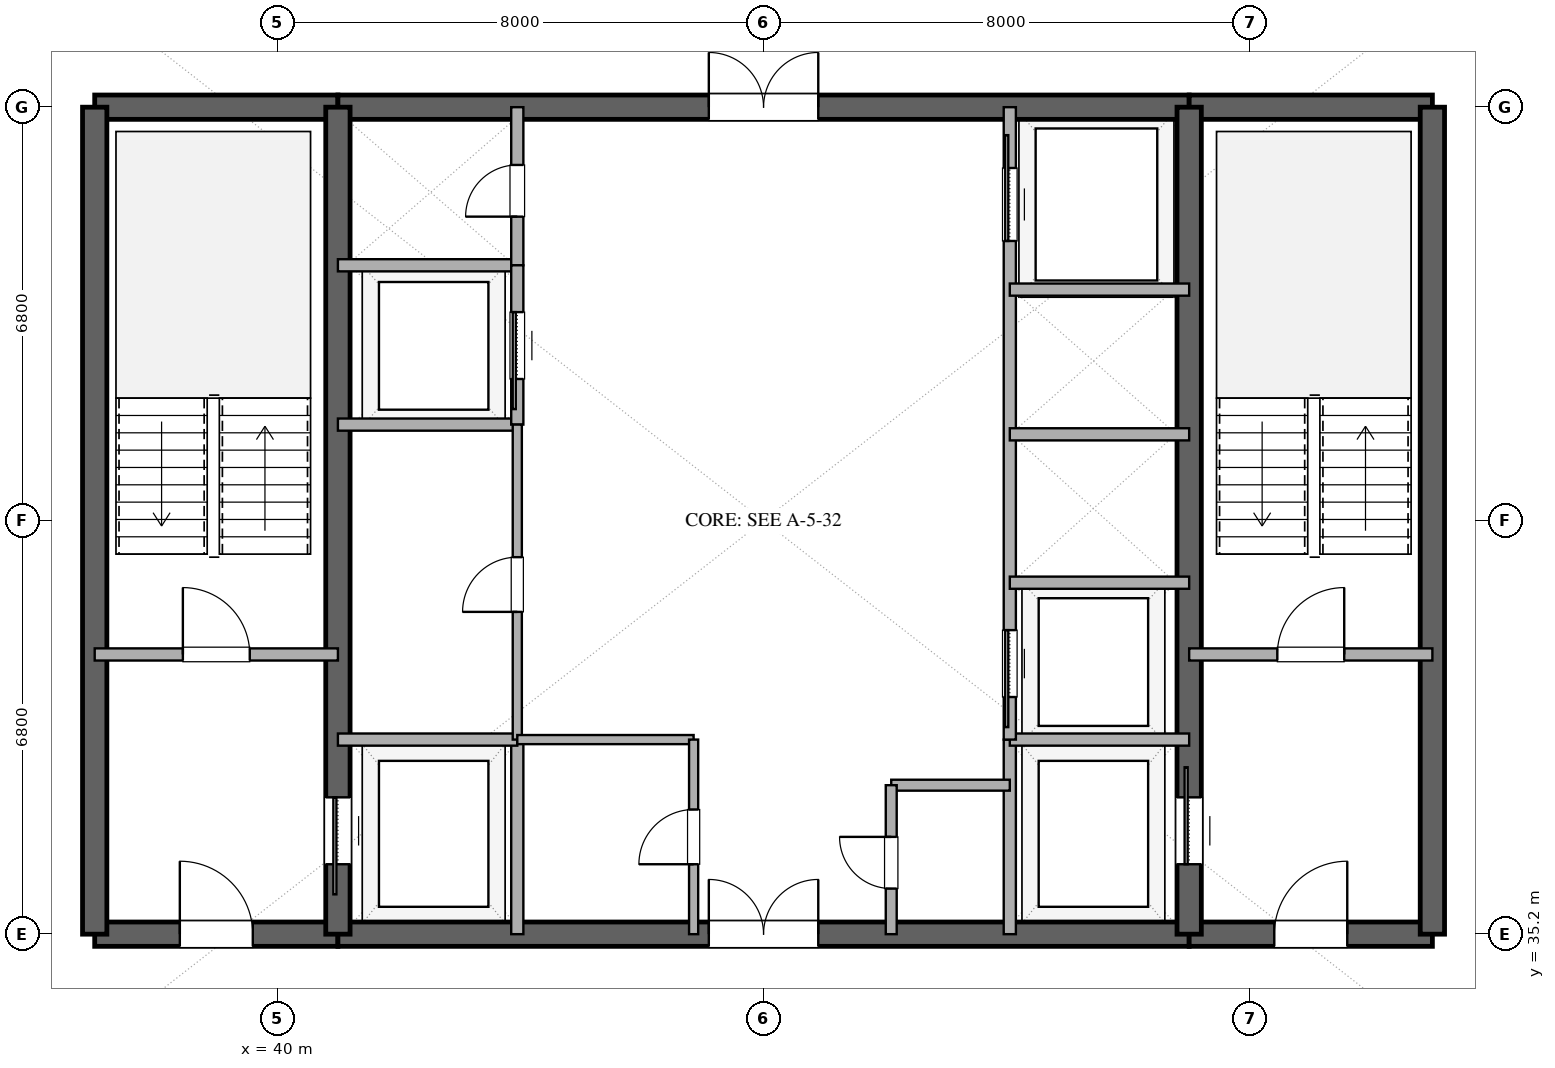
"""IFC4 building model, lengths in metres.
Left out: names, types, materials, properties, quantities, classifications, styles, units other than length and angle.
Written with IfcOpenShell. Run it as: python <this file> out.ifc"""

import sys

from ifc_helpers import new_model, si_unit, direction, frame, frame_2d, origin, place, context, subcontext, project, spatial, rectangle, extrude, element, fill, save


model = new_model("IFC4")
c1 = context("Model", 3, precision=1e-05, world=origin(), true_north=direction((0.0, 1.0)))
c2 = subcontext(c1, "Body", "Model", "MODEL_VIEW")
j1 = project(units=[si_unit("LENGTHUNIT", "METRE"), si_unit("PLANEANGLEUNIT", "RADIAN")], contexts=[c1])
p1 = place(None, origin())
s1 = spatial("IfcSite", under=j1, at=p1, CompositionType="ELEMENT")
p2 = place(p1, origin())
s2 = spatial("IfcBuilding", under=s1, at=p2, CompositionType="ELEMENT")
p3 = place(p2, frame((0.0, 0.0, 213.6)))
s3 = spatial("IfcBuildingStorey", under=s2, at=p3, CompositionType="ELEMENT", Elevation=213.6)
p4 = place(p3, frame((37.0, 35.2, 0.0), z_axis=(0.0, 0.0, 1.0), x_axis=(1.0, 0.0, 0.0)))
e1 = element("IfcWall", 1, at=p4, inside=s3, PredefinedType="SHEAR", context=c2, shape_type="SweptSolid", body=[
    extrude(rectangle(XDim=4.0, YDim=0.4, at=frame_2d((2.0, 0.0))), origin(), (0.0, 0.0, 1.0), 3.36),
])
p5 = place(p4, frame((1.4, 0.0, 0.0)))
e2 = element("IfcOpeningElement", 2, at=p5, cuts=e1, PredefinedType="OPENING", context=c2, shape_type="SweptSolid", body=[
    extrude(rectangle(XDim=1.2, YDim=2.15, at=frame_2d((0.6, 1.075))), frame((0.0, 0.21, 0.0), z_axis=(0.0, -1.0, 0.0), x_axis=(1.0, 0.0, 0.0)), (0.0, 0.0, 1.0), 0.42),
])
p6 = place(p3, frame((41.0, 35.2, 0.0), z_axis=(0.0, 0.0, 1.0), x_axis=(1.0, 0.0, 0.0)))
e3 = element("IfcWall", 3, at=p6, inside=s3, PredefinedType="SHEAR", context=c2, shape_type="SweptSolid", body=[
    extrude(rectangle(XDim=14.0, YDim=0.4, at=frame_2d((7.0, 0.0))), origin(), (0.0, 0.0, 1.0), 3.36),
])
p7 = place(p6, frame((6.1, 0.0, 0.0)))
e4 = element("IfcOpeningElement", 4, at=p7, cuts=e3, PredefinedType="OPENING", context=c2, shape_type="SweptSolid", body=[
    extrude(rectangle(XDim=1.8, YDim=2.25, at=frame_2d((0.9, 1.125))), frame((0.0, 0.21, 0.0), z_axis=(0.0, -1.0, 0.0), x_axis=(1.0, 0.0, 0.0)), (0.0, 0.0, 1.0), 0.42),
])
p8 = place(p3, frame((55.0, 35.2, 0.0), z_axis=(0.0, 0.0, 1.0), x_axis=(1.0, 0.0, 0.0)))
e5 = element("IfcWall", 5, at=p8, inside=s3, PredefinedType="SHEAR", context=c2, shape_type="SweptSolid", body=[
    extrude(rectangle(XDim=4.0, YDim=0.4, at=frame_2d((2.0, 0.0))), origin(), (0.0, 0.0, 1.0), 3.36),
])
p9 = place(p8, frame((1.4, 0.0, 0.0)))
e6 = element("IfcOpeningElement", 6, at=p9, cuts=e5, PredefinedType="OPENING", context=c2, shape_type="SweptSolid", body=[
    extrude(rectangle(XDim=1.2, YDim=2.15, at=frame_2d((0.6, 1.075))), frame((0.0, 0.21, 0.0), z_axis=(0.0, -1.0, 0.0), x_axis=(1.0, 0.0, 0.0)), (0.0, 0.0, 1.0), 0.42),
])
p10 = place(p3, frame((37.0, 48.8, 0.0), z_axis=(0.0, 0.0, 1.0), x_axis=(1.0, 0.0, 0.0)))
e7 = element("IfcWall", 7, at=p10, inside=s3, PredefinedType="SHEAR", context=c2, shape_type="SweptSolid", body=[
    extrude(rectangle(XDim=4.0, YDim=0.4, at=frame_2d((2.0, 0.0))), origin(), (0.0, 0.0, 1.0), 3.36),
])
p11 = place(p3, frame((41.0, 48.8, 0.0), z_axis=(0.0, 0.0, 1.0), x_axis=(1.0, 0.0, 0.0)))
e8 = element("IfcWall", 8, at=p11, inside=s3, PredefinedType="SHEAR", context=c2, shape_type="SweptSolid", body=[
    extrude(rectangle(XDim=14.0, YDim=0.4, at=frame_2d((7.0, 0.0))), origin(), (0.0, 0.0, 1.0), 3.36),
])
p12 = place(p11, frame((6.1, 0.0, 0.0)))
e9 = element("IfcOpeningElement", 9, at=p12, cuts=e8, PredefinedType="OPENING", context=c2, shape_type="SweptSolid", body=[
    extrude(rectangle(XDim=1.8, YDim=2.25, at=frame_2d((0.9, 1.125))), frame((0.0, 0.21, 0.0), z_axis=(0.0, -1.0, 0.0), x_axis=(1.0, 0.0, 0.0)), (0.0, 0.0, 1.0), 0.42),
])
p13 = place(p3, frame((55.0, 48.8, 0.0), z_axis=(0.0, 0.0, 1.0), x_axis=(1.0, 0.0, 0.0)))
e10 = element("IfcWall", 10, at=p13, inside=s3, PredefinedType="SHEAR", context=c2, shape_type="SweptSolid", body=[
    extrude(rectangle(XDim=4.0, YDim=0.4, at=frame_2d((2.0, 0.0))), origin(), (0.0, 0.0, 1.0), 3.36),
])
for number, where, z_axis, x_axis in (
    (11, (37.0, 35.2, 0.0), (0.0, 0.0, 1.0), (0.0, 1.0, 0.0)),
    (12, (59.0, 35.2, 0.0), (0.0, 0.0, 1.0), (0.0, 1.0, 0.0)),
):
    element("IfcWall", number, at=place(p3, frame(where, z_axis=z_axis, x_axis=x_axis)), inside=s3, PredefinedType="SHEAR", context=c2, shape_type="SweptSolid", body=[
        extrude(rectangle(XDim=13.6, YDim=0.4, at=frame_2d((6.8, 0.0))), origin(), (0.0, 0.0, 1.0), 3.36),
    ])
p14 = place(p3, frame((41.0, 35.2, 0.0), z_axis=(0.0, 0.0, 1.0), x_axis=(0.0, 1.0, 0.0)))
e13 = element("IfcWall", 13, at=p14, inside=s3, PredefinedType="SHEAR", context=c2, shape_type="SweptSolid", body=[
    extrude(rectangle(XDim=13.6, YDim=0.4, at=frame_2d((6.8, 0.0))), origin(), (0.0, 0.0, 1.0), 3.36),
])
p15 = place(p14, frame((1.15, 0.0, 0.0)))
e14 = element("IfcOpeningElement", 14, at=p15, cuts=e13, PredefinedType="OPENING", context=c2, shape_type="SweptSolid", body=[
    extrude(rectangle(XDim=1.1, YDim=2.2, at=frame_2d((0.55, 1.1))), frame((0.0, 0.21, 0.0), z_axis=(0.0, -1.0, 0.0), x_axis=(1.0, 0.0, 0.0)), (0.0, 0.0, 1.0), 0.42),
])
p16 = place(p3, frame((55.0, 35.2, 0.0), z_axis=(0.0, 0.0, 1.0), x_axis=(0.0, 1.0, 0.0)))
e15 = element("IfcWall", 15, at=p16, inside=s3, PredefinedType="SHEAR", context=c2, shape_type="SweptSolid", body=[
    extrude(rectangle(XDim=13.6, YDim=0.4, at=frame_2d((6.8, 0.0))), origin(), (0.0, 0.0, 1.0), 3.36),
])
p17 = place(p16, frame((1.15, 0.0, 0.0)))
e16 = element("IfcOpeningElement", 16, at=p17, cuts=e15, PredefinedType="OPENING", context=c2, shape_type="SweptSolid", body=[
    extrude(rectangle(XDim=1.1, YDim=2.2, at=frame_2d((0.55, 1.1))), frame((0.0, 0.21, 0.0), z_axis=(0.0, -1.0, 0.0), x_axis=(1.0, 0.0, 0.0)), (0.0, 0.0, 1.0), 0.42),
])
p18 = place(p3, frame((37.0, 39.8, 0.0), z_axis=(0.0, 0.0, 1.0), x_axis=(1.0, 0.0, 0.0)))
e17 = element("IfcWall", 17, at=p18, inside=s3, PredefinedType="SOLIDWALL", context=c2, shape_type="SweptSolid", body=[
    extrude(rectangle(XDim=4.0, YDim=0.2, at=frame_2d((2.0, 0.0))), origin(), (0.0, 0.0, 1.0), 2.72),
])
p19 = place(p18, frame((1.45, 0.0, 0.0)))
e18 = element("IfcOpeningElement", 18, at=p19, cuts=e17, PredefinedType="OPENING", context=c2, shape_type="SweptSolid", body=[
    extrude(rectangle(XDim=1.1, YDim=2.15, at=frame_2d((0.55, 1.075))), frame((0.0, 0.11, 0.0), z_axis=(0.0, -1.0, 0.0), x_axis=(1.0, 0.0, 0.0)), (0.0, 0.0, 1.0), 0.22),
])
p20 = place(p3, frame((55.0, 39.8, 0.0), z_axis=(0.0, 0.0, 1.0), x_axis=(1.0, 0.0, 0.0)))
e19 = element("IfcWall", 19, at=p20, inside=s3, PredefinedType="SOLIDWALL", context=c2, shape_type="SweptSolid", body=[
    extrude(rectangle(XDim=4.0, YDim=0.2, at=frame_2d((2.0, 0.0))), origin(), (0.0, 0.0, 1.0), 2.72),
])
p21 = place(p20, frame((1.45, 0.0, 0.0)))
e20 = element("IfcOpeningElement", 20, at=p21, cuts=e19, PredefinedType="OPENING", context=c2, shape_type="SweptSolid", body=[
    extrude(rectangle(XDim=1.1, YDim=2.15, at=frame_2d((0.55, 1.075))), frame((0.0, 0.11, 0.0), z_axis=(0.0, -1.0, 0.0), x_axis=(1.0, 0.0, 0.0)), (0.0, 0.0, 1.0), 0.22),
])
p22 = place(p3, frame((43.95, 35.2, 0.0), z_axis=(0.0, 0.0, 1.0), x_axis=(0.0, 1.0, 0.0)))
e21 = element("IfcWall", 21, at=p22, inside=s3, PredefinedType="SOLIDWALL", context=c2, shape_type="SweptSolid", body=[
    extrude(rectangle(XDim=3.2, YDim=0.2, at=frame_2d((1.6, 0.0))), origin(), (0.0, 0.0, 1.0), 2.72),
])
p23 = place(p3, frame((41.0, 38.4, 0.0), z_axis=(0.0, 0.0, 1.0), x_axis=(1.0, 0.0, 0.0)))
e22 = element("IfcWall", 22, at=p23, inside=s3, PredefinedType="SOLIDWALL", context=c2, shape_type="SweptSolid", body=[
    extrude(rectangle(XDim=2.95, YDim=0.2, at=frame_2d((1.475, 0.0))), origin(), (0.0, 0.0, 1.0), 2.72),
])
p24 = place(p3, frame((52.05, 35.2, 0.0), z_axis=(0.0, 0.0, 1.0), x_axis=(0.0, 1.0, 0.0)))
e23 = element("IfcWall", 23, at=p24, inside=s3, PredefinedType="SOLIDWALL", context=c2, shape_type="SweptSolid", body=[
    extrude(rectangle(XDim=3.2, YDim=0.2, at=frame_2d((1.6, 0.0))), origin(), (0.0, 0.0, 1.0), 2.72),
])
for number, where, z_axis, x_axis in (
    (24, (52.05, 38.4, 0.0), (0.0, 0.0, 1.0), (1.0, 0.0, 0.0)),
    (25, (41.0, 46.2, 0.0), (0.0, 0.0, 1.0), (1.0, 0.0, 0.0)),
):
    element("IfcWall", number, at=place(p3, frame(where, z_axis=z_axis, x_axis=x_axis)), inside=s3, PredefinedType="SOLIDWALL", context=c2, shape_type="SweptSolid", body=[
        extrude(rectangle(XDim=2.95, YDim=0.2, at=frame_2d((1.475, 0.0))), origin(), (0.0, 0.0, 1.0), 2.72),
    ])
p25 = place(p3, frame((43.95, 46.2, 0.0), z_axis=(0.0, 0.0, 1.0), x_axis=(0.0, 1.0, 0.0)))
e26 = element("IfcWall", 26, at=p25, inside=s3, PredefinedType="SOLIDWALL", context=c2, shape_type="SweptSolid", body=[
    extrude(rectangle(XDim=2.6, YDim=0.2, at=frame_2d((1.3, 0.0))), origin(), (0.0, 0.0, 1.0), 2.72),
])
p26 = place(p25, frame((0.8, 0.0, 0.0)))
e27 = element("IfcOpeningElement", 27, at=p26, cuts=e26, PredefinedType="OPENING", context=c2, shape_type="SweptSolid", body=[
    extrude(rectangle(XDim=0.85, YDim=2.15, at=frame_2d((0.425, 1.075))), frame((0.0, 0.11, 0.0), z_axis=(0.0, -1.0, 0.0), x_axis=(1.0, 0.0, 0.0)), (0.0, 0.0, 1.0), 0.22),
])
p27 = place(p3, frame((41.0, 43.58, 0.0), z_axis=(0.0, 0.0, 1.0), x_axis=(1.0, 0.0, 0.0)))
e28 = element("IfcWall", 28, at=p27, inside=s3, PredefinedType="SOLIDWALL", context=c2, shape_type="SweptSolid", body=[
    extrude(rectangle(XDim=2.95, YDim=0.2, at=frame_2d((1.475, 0.0))), origin(), (0.0, 0.0, 1.0), 2.72),
])
p28 = place(p3, frame((43.95, 43.58, 0.0), z_axis=(0.0, 0.0, 1.0), x_axis=(0.0, 1.0, 0.0)))
e29 = element("IfcWall", 29, at=p28, inside=s3, PredefinedType="SOLIDWALL", context=c2, shape_type="SweptSolid", body=[
    extrude(rectangle(XDim=2.62, YDim=0.2, at=frame_2d((1.31, 0.0))), origin(), (0.0, 0.0, 1.0), 2.72),
])
p29 = place(p28, frame((0.75, 0.0, 0.0)))
e30 = element("IfcOpeningElement", 30, at=p29, cuts=e29, PredefinedType="OPENING", context=c2, shape_type="SweptSolid", body=[
    extrude(rectangle(XDim=1.1, YDim=2.2, at=frame_2d((0.55, 1.1))), frame((0.0, 0.11, 0.0), z_axis=(0.0, -1.0, 0.0), x_axis=(1.0, 0.0, 0.0)), (0.0, 0.0, 1.0), 0.22),
])
p30 = place(p3, frame((43.95, 38.4, 0.0), z_axis=(0.0, 0.0, 1.0), x_axis=(0.0, 1.0, 0.0)))
e31 = element("IfcWall", 31, at=p30, inside=s3, PredefinedType="PARTITIONING", context=c2, shape_type="SweptSolid", body=[
    extrude(rectangle(XDim=5.18, YDim=0.15, at=frame_2d((2.59, 0.0))), origin(), (0.0, 0.0, 1.0), 2.72),
])
p31 = place(p30, frame((2.1, 0.0, 0.0)))
e32 = element("IfcOpeningElement", 32, at=p31, cuts=e31, PredefinedType="OPENING", context=c2, shape_type="SweptSolid", body=[
    extrude(rectangle(XDim=0.9, YDim=2.15, at=frame_2d((0.45, 1.075))), frame((0.0, 0.085, 0.0), z_axis=(0.0, -1.0, 0.0), x_axis=(1.0, 0.0, 0.0)), (0.0, 0.0, 1.0), 0.17),
])
p32 = place(p3, frame((52.05, 38.4, 0.0), z_axis=(0.0, 0.0, 1.0), x_axis=(0.0, 1.0, 0.0)))
e33 = element("IfcWall", 33, at=p32, inside=s3, PredefinedType="SOLIDWALL", context=c2, shape_type="SweptSolid", body=[
    extrude(rectangle(XDim=10.4, YDim=0.2, at=frame_2d((5.2, 0.0))), origin(), (0.0, 0.0, 1.0), 2.72),
])
p33 = place(p32, frame((0.7, 0.0, 0.0)))
e34 = element("IfcOpeningElement", 34, at=p33, cuts=e33, PredefinedType="OPENING", context=c2, shape_type="SweptSolid", body=[
    extrude(rectangle(XDim=1.1, YDim=2.2, at=frame_2d((0.55, 1.1))), frame((0.0, 0.11, 0.0), z_axis=(0.0, -1.0, 0.0), x_axis=(1.0, 0.0, 0.0)), (0.0, 0.0, 1.0), 0.22),
])
p34 = place(p32, frame((8.2, 0.0, 0.0)))
e35 = element("IfcOpeningElement", 35, at=p34, cuts=e33, PredefinedType="OPENING", context=c2, shape_type="SweptSolid", body=[
    extrude(rectangle(XDim=1.2, YDim=2.2, at=frame_2d((0.6, 1.1))), frame((0.0, 0.11, 0.0), z_axis=(0.0, -1.0, 0.0), x_axis=(1.0, 0.0, 0.0)), (0.0, 0.0, 1.0), 0.22),
])
for number, where, z_axis, x_axis in (
    (36, (52.05, 40.98, 0.0), (0.0, 0.0, 1.0), (1.0, 0.0, 0.0)),
    (37, (52.05, 43.42, 0.0), (0.0, 0.0, 1.0), (1.0, 0.0, 0.0)),
    (38, (52.05, 45.8, 0.0), (0.0, 0.0, 1.0), (1.0, 0.0, 0.0)),
):
    element("IfcWall", number, at=place(p3, frame(where, z_axis=z_axis, x_axis=x_axis)), inside=s3, PredefinedType="SOLIDWALL", context=c2, shape_type="SweptSolid", body=[
        extrude(rectangle(XDim=2.95, YDim=0.2, at=frame_2d((1.475, 0.0))), origin(), (0.0, 0.0, 1.0), 2.72),
    ])
p35 = place(p3, frame((43.95, 38.4, 0.0), z_axis=(0.0, 0.0, 1.0), x_axis=(1.0, 0.0, 0.0)))
e39 = element("IfcWall", 39, at=p35, inside=s3, PredefinedType="PARTITIONING", context=c2, shape_type="SweptSolid", body=[
    extrude(rectangle(XDim=2.9, YDim=0.15, at=frame_2d((1.45, 0.0))), origin(), (0.0, 0.0, 1.0), 2.72),
])
p36 = place(p3, frame((46.85, 35.2, 0.0), z_axis=(0.0, 0.0, 1.0), x_axis=(0.0, 1.0, 0.0)))
e40 = element("IfcWall", 40, at=p36, inside=s3, PredefinedType="PARTITIONING", context=c2, shape_type="SweptSolid", body=[
    extrude(rectangle(XDim=3.2, YDim=0.15, at=frame_2d((1.6, 0.0))), origin(), (0.0, 0.0, 1.0), 2.72),
])
p37 = place(p36, frame((1.15, 0.0, 0.0)))
e41 = element("IfcOpeningElement", 41, at=p37, cuts=e40, PredefinedType="OPENING", context=c2, shape_type="SweptSolid", body=[
    extrude(rectangle(XDim=0.9, YDim=2.15, at=frame_2d((0.45, 1.075))), frame((0.0, 0.085, 0.0), z_axis=(0.0, -1.0, 0.0), x_axis=(1.0, 0.0, 0.0)), (0.0, 0.0, 1.0), 0.17),
])
p38 = place(p3, frame((50.1, 37.65, 0.0), z_axis=(0.0, 0.0, 1.0), x_axis=(1.0, 0.0, 0.0)))
e42 = element("IfcWall", 42, at=p38, inside=s3, PredefinedType="PLUMBINGWALL", context=c2, shape_type="SweptSolid", body=[
    extrude(rectangle(XDim=1.95, YDim=0.18, at=frame_2d((0.975, 0.0))), origin(), (0.0, 0.0, 1.0), 2.72),
])
p39 = place(p3, frame((50.1, 35.2, 0.0), z_axis=(0.0, 0.0, 1.0), x_axis=(0.0, 1.0, 0.0)))
e43 = element("IfcWall", 43, at=p39, inside=s3, PredefinedType="PLUMBINGWALL", context=c2, shape_type="SweptSolid", body=[
    extrude(rectangle(XDim=2.45, YDim=0.18, at=frame_2d((1.225, 0.0))), origin(), (0.0, 0.0, 1.0), 2.72),
])
p40 = place(p39, frame((0.75, 0.0, 0.0)))
e44 = element("IfcOpeningElement", 44, at=p40, cuts=e43, PredefinedType="OPENING", context=c2, shape_type="SweptSolid", body=[
    extrude(rectangle(XDim=0.85, YDim=2.1, at=frame_2d((0.425, 1.05))), frame((0.0, 0.1, 0.0), z_axis=(0.0, -1.0, 0.0), x_axis=(1.0, 0.0, 0.0)), (0.0, 0.0, 1.0), 0.2),
])
p41 = place(p15, origin())
e45 = element("IfcDoor", 45, at=p41, inside=s3, OperationType="SLIDING_TO_LEFT", PredefinedType="DOOR", context=c2, shape_type="SweptSolid", body=[
    extrude(rectangle(XDim=1.1, YDim=2.2, at=frame_2d((0.55, 1.1))), frame((0.0, 0.025, 0.0), z_axis=(0.0, -1.0, 0.0), x_axis=(1.0, 0.0, 0.0)), (0.0, 0.0, 1.0), 0.05),
])
fill(e14, e45)
p42 = place(p17, origin())
e46 = element("IfcDoor", 46, at=p42, inside=s3, OperationType="SLIDING_TO_RIGHT", PredefinedType="DOOR", context=c2, shape_type="SweptSolid", body=[
    extrude(rectangle(XDim=1.1, YDim=2.2, at=frame_2d((0.55, 1.1))), frame((0.0, 0.025, 0.0), z_axis=(0.0, -1.0, 0.0), x_axis=(1.0, 0.0, 0.0)), (0.0, 0.0, 1.0), 0.05),
])
fill(e16, e46)
p43 = place(p5, origin())
e47 = element("IfcDoor", 47, at=p43, inside=s3, OperationType="SINGLE_SWING_LEFT", PredefinedType="DOOR", context=c2, shape_type="SweptSolid", body=[
    extrude(rectangle(XDim=1.2, YDim=2.15, at=frame_2d((0.6, 1.075))), frame((0.0, 0.025, 0.0), z_axis=(0.0, -1.0, 0.0), x_axis=(1.0, 0.0, 0.0)), (0.0, 0.0, 1.0), 0.05),
])
fill(e2, e47)
p44 = place(p9, origin())
e48 = element("IfcDoor", 48, at=p44, inside=s3, OperationType="SINGLE_SWING_RIGHT", PredefinedType="DOOR", context=c2, shape_type="SweptSolid", body=[
    extrude(rectangle(XDim=1.2, YDim=2.15, at=frame_2d((0.6, 1.075))), frame((0.0, 0.025, 0.0), z_axis=(0.0, -1.0, 0.0), x_axis=(1.0, 0.0, 0.0)), (0.0, 0.0, 1.0), 0.05),
])
fill(e6, e48)
p45 = place(p7, origin())
e49 = element("IfcDoor", 49, at=p45, inside=s3, OperationType="DOUBLE_DOOR_SINGLE_SWING", PredefinedType="DOOR", context=c2, shape_type="SweptSolid", body=[
    extrude(rectangle(XDim=1.8, YDim=2.25, at=frame_2d((0.9, 1.125))), frame((0.0, 0.025, 0.0), z_axis=(0.0, -1.0, 0.0), x_axis=(1.0, 0.0, 0.0)), (0.0, 0.0, 1.0), 0.05),
])
fill(e4, e49)
p46 = place(p12, origin())
e50 = element("IfcDoor", 50, at=p46, inside=s3, OperationType="DOUBLE_DOOR_SINGLE_SWING", PredefinedType="DOOR", context=c2, shape_type="SweptSolid", body=[
    extrude(rectangle(XDim=1.8, YDim=2.25, at=frame_2d((0.9, 1.125))), frame((0.0, 0.025, 0.0), z_axis=(0.0, -1.0, 0.0), x_axis=(1.0, 0.0, 0.0)), (0.0, 0.0, 1.0), 0.05),
])
fill(e9, e50)
p47 = place(p19, origin())
e51 = element("IfcDoor", 51, at=p47, inside=s3, OperationType="SINGLE_SWING_LEFT", PredefinedType="DOOR", context=c2, shape_type="SweptSolid", body=[
    extrude(rectangle(XDim=1.1, YDim=2.15, at=frame_2d((0.55, 1.075))), frame((0.0, 0.025, 0.0), z_axis=(0.0, -1.0, 0.0), x_axis=(1.0, 0.0, 0.0)), (0.0, 0.0, 1.0), 0.05),
])
fill(e18, e51)
p48 = place(p21, origin())
e52 = element("IfcDoor", 52, at=p48, inside=s3, OperationType="SINGLE_SWING_RIGHT", PredefinedType="DOOR", context=c2, shape_type="SweptSolid", body=[
    extrude(rectangle(XDim=1.1, YDim=2.15, at=frame_2d((0.55, 1.075))), frame((0.0, 0.025, 0.0), z_axis=(0.0, -1.0, 0.0), x_axis=(1.0, 0.0, 0.0)), (0.0, 0.0, 1.0), 0.05),
])
fill(e20, e52)
p49 = place(p26, origin())
e53 = element("IfcDoor", 53, at=p49, inside=s3, OperationType="SINGLE_SWING_LEFT", PredefinedType="DOOR", context=c2, shape_type="SweptSolid", body=[
    extrude(rectangle(XDim=0.85, YDim=2.15, at=frame_2d((0.425, 1.075))), frame((0.0, 0.025, 0.0), z_axis=(0.0, -1.0, 0.0), x_axis=(1.0, 0.0, 0.0)), (0.0, 0.0, 1.0), 0.05),
])
fill(e27, e53)
p50 = place(p29, origin())
e54 = element("IfcDoor", 54, at=p50, inside=s3, OperationType="SLIDING_TO_LEFT", PredefinedType="DOOR", context=c2, shape_type="SweptSolid", body=[
    extrude(rectangle(XDim=1.1, YDim=2.2, at=frame_2d((0.55, 1.1))), frame((0.0, 0.025, 0.0), z_axis=(0.0, -1.0, 0.0), x_axis=(1.0, 0.0, 0.0)), (0.0, 0.0, 1.0), 0.05),
])
fill(e30, e54)
p51 = place(p31, origin())
e55 = element("IfcDoor", 55, at=p51, inside=s3, OperationType="SINGLE_SWING_LEFT", PredefinedType="DOOR", context=c2, shape_type="SweptSolid", body=[
    extrude(rectangle(XDim=0.9, YDim=2.15, at=frame_2d((0.45, 1.075))), frame((0.0, 0.025, 0.0), z_axis=(0.0, -1.0, 0.0), x_axis=(1.0, 0.0, 0.0)), (0.0, 0.0, 1.0), 0.05),
])
fill(e32, e55)
p52 = place(p33, origin())
e56 = element("IfcDoor", 56, at=p52, inside=s3, OperationType="SLIDING_TO_LEFT", PredefinedType="DOOR", context=c2, shape_type="SweptSolid", body=[
    extrude(rectangle(XDim=1.1, YDim=2.2, at=frame_2d((0.55, 1.1))), frame((0.0, 0.025, 0.0), z_axis=(0.0, -1.0, 0.0), x_axis=(1.0, 0.0, 0.0)), (0.0, 0.0, 1.0), 0.05),
])
fill(e34, e56)
p53 = place(p34, origin())
e57 = element("IfcDoor", 57, at=p53, inside=s3, OperationType="SLIDING_TO_RIGHT", PredefinedType="DOOR", context=c2, shape_type="SweptSolid", body=[
    extrude(rectangle(XDim=1.2, YDim=2.2, at=frame_2d((0.6, 1.1))), frame((0.0, 0.025, 0.0), z_axis=(0.0, -1.0, 0.0), x_axis=(1.0, 0.0, 0.0)), (0.0, 0.0, 1.0), 0.05),
])
fill(e35, e57)
p54 = place(p37, origin())
e58 = element("IfcDoor", 58, at=p54, inside=s3, OperationType="SINGLE_SWING_LEFT", PredefinedType="DOOR", context=c2, shape_type="SweptSolid", body=[
    extrude(rectangle(XDim=0.9, YDim=2.15, at=frame_2d((0.45, 1.075))), frame((0.0, 0.025, 0.0), z_axis=(0.0, -1.0, 0.0), x_axis=(1.0, 0.0, 0.0)), (0.0, 0.0, 1.0), 0.05),
])
fill(e41, e58)
p55 = place(p40, origin())
e59 = element("IfcDoor", 59, at=p55, inside=s3, OperationType="SINGLE_SWING_RIGHT", PredefinedType="DOOR", context=c2, shape_type="SweptSolid", body=[
    extrude(rectangle(XDim=0.85, YDim=2.1, at=frame_2d((0.425, 1.05))), frame((0.0, 0.025, 0.0), z_axis=(0.0, -1.0, 0.0), x_axis=(1.0, 0.0, 0.0)), (0.0, 0.0, 1.0), 0.05),
])
fill(e44, e59)
save(model, sys.argv[1])
